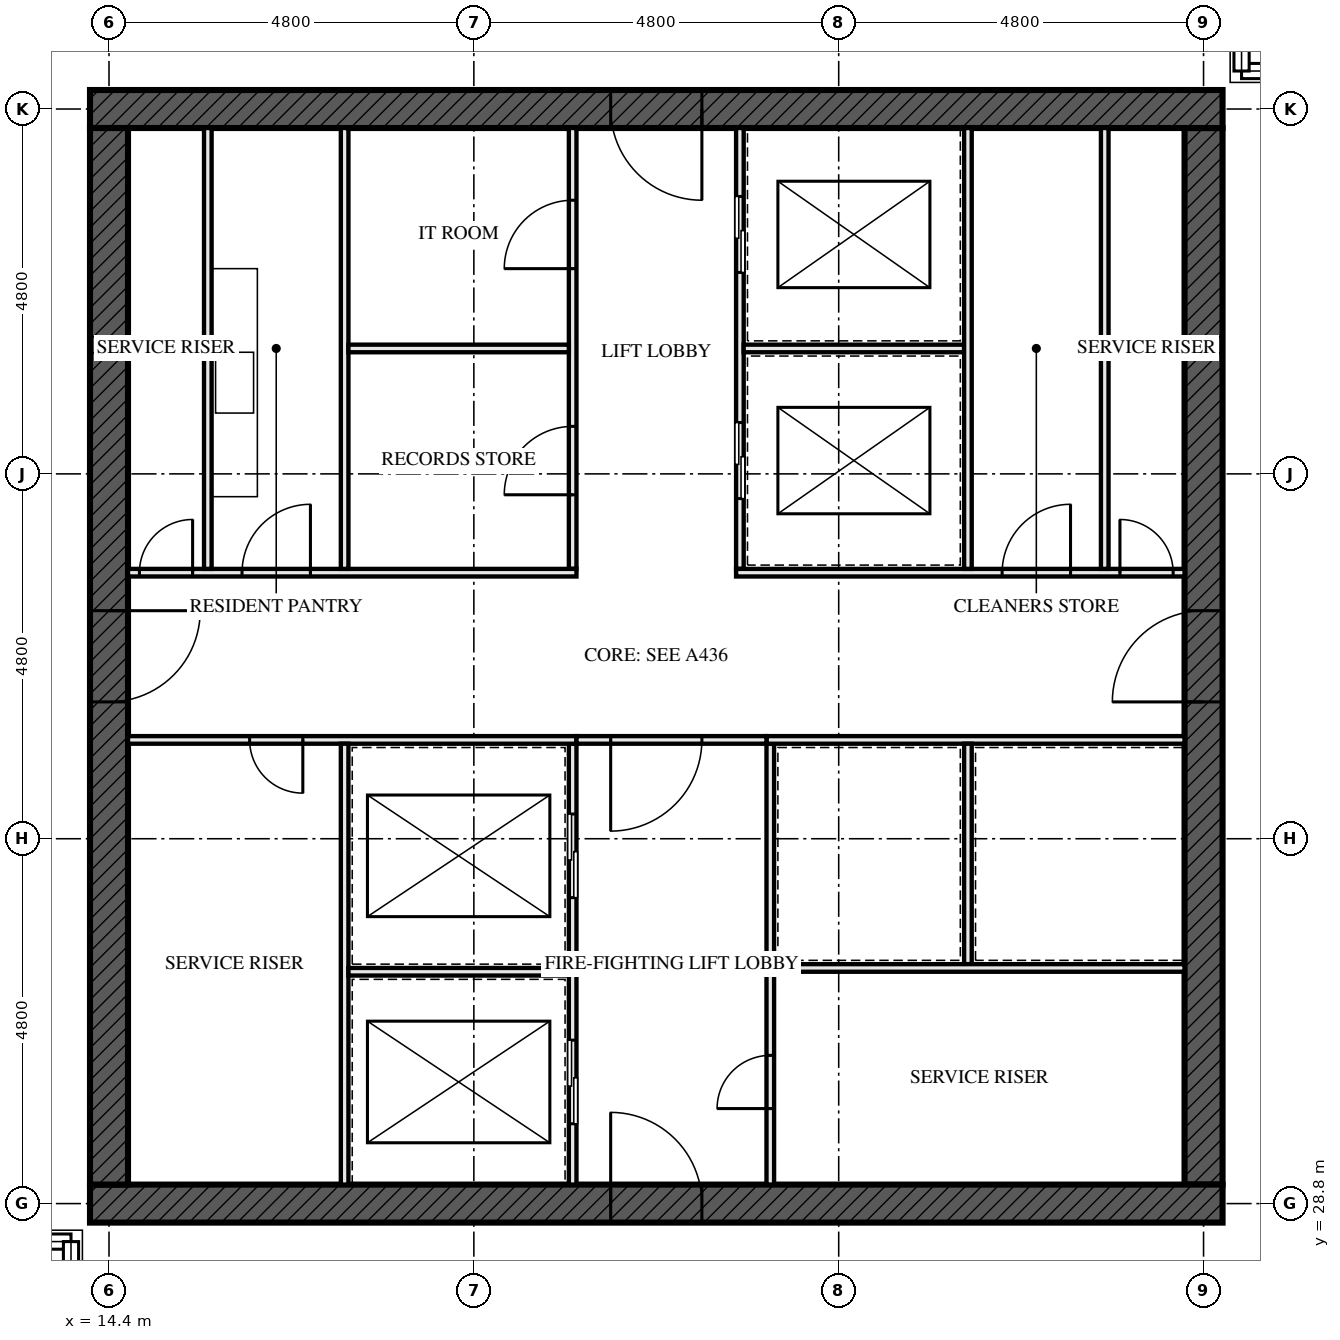
"""IFC4 building model, lengths in metres.
Left out: names, types, materials, properties, quantities, classifications, styles, units other than length and angle.
Written with IfcOpenShell. Run it as: python <this file> out.ifc"""

import sys

from ifc_helpers import new_model, si_unit, direction, frame, frame_2d, origin, place, context, subcontext, project, spatial, rectangle, extrude, element, fill, save


model = new_model("IFC4")
c1 = context("Model", 3, precision=1e-05, world=origin(), true_north=direction((0.0, 1.0)))
c2 = subcontext(c1, "Body", "Model", "MODEL_VIEW")
j1 = project(units=[si_unit("LENGTHUNIT", "METRE"), si_unit("PLANEANGLEUNIT", "RADIAN")], contexts=[c1])
p1 = place(None, origin())
s1 = spatial("IfcSite", under=j1, at=p1, CompositionType="ELEMENT")
p2 = place(p1, origin())
s2 = spatial("IfcBuilding", under=s1, at=p2, CompositionType="ELEMENT")
p3 = place(p2, frame((0.0, 0.0, 136.5)))
s3 = spatial("IfcBuildingStorey", under=s2, at=p3, CompositionType="ELEMENT", Elevation=136.5)
p4 = place(p3, frame((14.15, 28.8, -0.25), z_axis=(0.0, 0.0, 1.0), x_axis=(1.0, 0.0, 0.0)))
e1 = element("IfcWall", 1, at=p4, inside=s3, PredefinedType="SHEAR", context=c2, shape_type="SweptSolid", body=[
    extrude(rectangle(XDim=14.9, YDim=0.5, at=frame_2d((7.45, 0.0))), origin(), (0.0, 0.0, 1.0), 4.58),
])
p5 = place(p4, frame((6.85, 0.0, 0.25)))
e2 = element("IfcOpeningElement", 2, at=p5, cuts=e1, PredefinedType="OPENING", context=c2, shape_type="SweptSolid", body=[
    extrude(rectangle(XDim=1.2, YDim=2.1, at=frame_2d((0.6, 1.05))), frame((0.0, 0.26, 0.0), z_axis=(0.0, -1.0, 0.0), x_axis=(1.0, 0.0, 0.0)), (0.0, 0.0, 1.0), 0.521),
])
p6 = place(p3, frame((29.05, 43.2, -0.25), z_axis=(0.0, 0.0, 1.0), x_axis=(-1.0, 0.0, 0.0)))
e3 = element("IfcWall", 3, at=p6, inside=s3, PredefinedType="SHEAR", context=c2, shape_type="SweptSolid", body=[
    extrude(rectangle(XDim=14.9, YDim=0.5, at=frame_2d((7.45, 0.0))), origin(), (0.0, 0.0, 1.0), 4.58),
])
p7 = place(p6, frame((6.85, 0.0, 0.25)))
e4 = element("IfcOpeningElement", 4, at=p7, cuts=e3, PredefinedType="OPENING", context=c2, shape_type="SweptSolid", body=[
    extrude(rectangle(XDim=1.2, YDim=2.1, at=frame_2d((0.6, 1.05))), frame((0.0, 0.26, 0.0), z_axis=(0.0, -1.0, 0.0), x_axis=(1.0, 0.0, 0.0)), (0.0, 0.0, 1.0), 0.521),
])
p8 = place(p3, frame((14.4, 42.95, -0.25), z_axis=(0.0, 0.0, 1.0), x_axis=(0.0, -1.0, 0.0)))
e5 = element("IfcWall", 5, at=p8, inside=s3, PredefinedType="SHEAR", context=c2, shape_type="SweptSolid", body=[
    extrude(rectangle(XDim=13.9, YDim=0.5, at=frame_2d((6.95, 0.0))), origin(), (0.0, 0.0, 1.0), 4.58),
])
p9 = place(p8, frame((6.35, 0.0, 0.25)))
e6 = element("IfcOpeningElement", 6, at=p9, cuts=e5, PredefinedType="OPENING", context=c2, shape_type="SweptSolid", body=[
    extrude(rectangle(XDim=1.2, YDim=2.1, at=frame_2d((0.6, 1.05))), frame((0.0, 0.26, 0.0), z_axis=(0.0, -1.0, 0.0), x_axis=(1.0, 0.0, 0.0)), (0.0, 0.0, 1.0), 0.521),
])
p10 = place(p3, frame((28.8, 29.05, -0.25), z_axis=(0.0, 0.0, 1.0), x_axis=(0.0, 1.0, 0.0)))
e7 = element("IfcWall", 7, at=p10, inside=s3, PredefinedType="SHEAR", context=c2, shape_type="SweptSolid", body=[
    extrude(rectangle(XDim=13.9, YDim=0.5, at=frame_2d((6.95, 0.0))), origin(), (0.0, 0.0, 1.0), 4.58),
])
p11 = place(p10, frame((6.35, 0.0, 0.25)))
e8 = element("IfcOpeningElement", 8, at=p11, cuts=e7, PredefinedType="OPENING", context=c2, shape_type="SweptSolid", body=[
    extrude(rectangle(XDim=1.2, YDim=2.1, at=frame_2d((0.6, 1.05))), frame((0.0, 0.26, 0.0), z_axis=(0.0, -1.0, 0.0), x_axis=(1.0, 0.0, 0.0)), (0.0, 0.0, 1.0), 0.521),
])
for number, where, z_axis, x_axis in (
    (9, (15.7, 37.15, 0.0), (0.0, 0.0, 1.0), (0.0, 1.0, 0.0)),
    (10, (27.5, 37.15, 0.0), (0.0, 0.0, 1.0), (0.0, 1.0, 0.0)),
):
    element("IfcWall", number, at=place(p3, frame(where, z_axis=z_axis, x_axis=x_axis)), inside=s3, PredefinedType="SOLIDWALL", context=c2, shape_type="SweptSolid", body=[
        extrude(rectangle(XDim=5.8, YDim=0.1, at=frame_2d((2.9, 0.0))), origin(), (0.0, 0.0, 1.0), 4.33),
    ])
p12 = place(p3, frame((20.5, 29.05, 0.0), z_axis=(0.0, 0.0, 1.0), x_axis=(0.0, 1.0, 0.0)))
e11 = element("IfcWall", 11, at=p12, inside=s3, PredefinedType="SOLIDWALL", context=c2, shape_type="SweptSolid", body=[
    extrude(rectangle(XDim=5.8, YDim=0.1, at=frame_2d((2.9, 0.0))), origin(), (0.0, 0.0, 1.0), 4.33),
])
p13 = place(p12, frame((0.8, 0.0, 0.0)))
e12 = element("IfcOpeningElement", 12, at=p13, cuts=e11, PredefinedType="OPENING", context=c2, shape_type="SweptSolid", body=[
    extrude(rectangle(XDim=1.1, YDim=2.3, at=frame_2d((0.55, 1.15))), frame((0.0, 0.061, 0.0), z_axis=(0.0, -1.0, 0.0), x_axis=(1.0, 0.0, 0.0)), (0.0, 0.0, 1.0), 0.121),
])
p14 = place(p12, frame((3.775, 0.0, 0.0)))
e13 = element("IfcOpeningElement", 13, at=p14, cuts=e11, PredefinedType="OPENING", context=c2, shape_type="SweptSolid", body=[
    extrude(rectangle(XDim=1.1, YDim=2.3, at=frame_2d((0.55, 1.15))), frame((0.0, 0.061, 0.0), z_axis=(0.0, -1.0, 0.0), x_axis=(1.0, 0.0, 0.0)), (0.0, 0.0, 1.0), 0.121),
])
p15 = place(p3, frame((20.5, 37.15, 0.0), z_axis=(0.0, 0.0, 1.0), x_axis=(0.0, 1.0, 0.0)))
e14 = element("IfcWall", 14, at=p15, inside=s3, PredefinedType="SOLIDWALL", context=c2, shape_type="SweptSolid", body=[
    extrude(rectangle(XDim=5.8, YDim=0.1, at=frame_2d((2.9, 0.0))), origin(), (0.0, 0.0, 1.0), 4.33),
])
p16 = place(p15, frame((0.975, 0.0, 0.0)))
e15 = element("IfcOpeningElement", 15, at=p16, cuts=e14, PredefinedType="OPENING", context=c2, shape_type="SweptSolid", body=[
    extrude(rectangle(XDim=0.9, YDim=2.1, at=frame_2d((0.45, 1.05))), frame((0.0, 0.061, 0.0), z_axis=(0.0, -1.0, 0.0), x_axis=(1.0, 0.0, 0.0)), (0.0, 0.0, 1.0), 0.121),
])
p17 = place(p15, frame((3.95, 0.0, 0.0)))
e16 = element("IfcOpeningElement", 16, at=p17, cuts=e14, PredefinedType="OPENING", context=c2, shape_type="SweptSolid", body=[
    extrude(rectangle(XDim=0.9, YDim=2.1, at=frame_2d((0.45, 1.05))), frame((0.0, 0.061, 0.0), z_axis=(0.0, -1.0, 0.0), x_axis=(1.0, 0.0, 0.0)), (0.0, 0.0, 1.0), 0.121),
])
p18 = place(p3, frame((22.7, 37.15, 0.0), z_axis=(0.0, 0.0, 1.0), x_axis=(0.0, 1.0, 0.0)))
e17 = element("IfcWall", 17, at=p18, inside=s3, PredefinedType="SOLIDWALL", context=c2, shape_type="SweptSolid", body=[
    extrude(rectangle(XDim=5.8, YDim=0.1, at=frame_2d((2.9, 0.0))), origin(), (0.0, 0.0, 1.0), 4.33),
])
p19 = place(p18, frame((0.925, 0.0, 0.0)))
e18 = element("IfcOpeningElement", 18, at=p19, cuts=e17, PredefinedType="OPENING", context=c2, shape_type="SweptSolid", body=[
    extrude(rectangle(XDim=1.0, YDim=2.1, at=frame_2d((0.5, 1.05))), frame((0.0, 0.061, 0.0), z_axis=(0.0, -1.0, 0.0), x_axis=(1.0, 0.0, 0.0)), (0.0, 0.0, 1.0), 0.121),
])
p20 = place(p18, frame((3.9, 0.0, 0.0)))
e19 = element("IfcOpeningElement", 19, at=p20, cuts=e17, PredefinedType="OPENING", context=c2, shape_type="SweptSolid", body=[
    extrude(rectangle(XDim=1.0, YDim=2.1, at=frame_2d((0.5, 1.05))), frame((0.0, 0.061, 0.0), z_axis=(0.0, -1.0, 0.0), x_axis=(1.0, 0.0, 0.0)), (0.0, 0.0, 1.0), 0.121),
])
p21 = place(p3, frame((23.1, 29.05, 0.0), z_axis=(0.0, 0.0, 1.0), x_axis=(0.0, 1.0, 0.0)))
e20 = element("IfcWall", 20, at=p21, inside=s3, PredefinedType="SOLIDWALL", context=c2, shape_type="SweptSolid", body=[
    extrude(rectangle(XDim=5.8, YDim=0.1, at=frame_2d((2.9, 0.0))), origin(), (0.0, 0.0, 1.0), 4.33),
])
p22 = place(p21, frame((1.0, 0.0, 0.0)))
e21 = element("IfcOpeningElement", 21, at=p22, cuts=e20, PredefinedType="OPENING", context=c2, shape_type="SweptSolid", body=[
    extrude(rectangle(XDim=0.7, YDim=2.1, at=frame_2d((0.35, 1.05))), frame((0.0, 0.061, 0.0), z_axis=(0.0, -1.0, 0.0), x_axis=(1.0, 0.0, 0.0)), (0.0, 0.0, 1.0), 0.121),
])
p23 = place(p3, frame((14.65, 34.9, 0.0), z_axis=(0.0, 0.0, 1.0), x_axis=(1.0, 0.0, 0.0)))
e22 = element("IfcWall", 22, at=p23, inside=s3, PredefinedType="SOLIDWALL", context=c2, shape_type="SweptSolid", body=[
    extrude(rectangle(XDim=5.9, YDim=0.1, at=frame_2d((2.95, 0.0))), origin(), (0.0, 0.0, 1.0), 4.33),
])
p24 = place(p23, frame((1.6, 0.0, 0.0)))
e23 = element("IfcOpeningElement", 23, at=p24, cuts=e22, PredefinedType="OPENING", context=c2, shape_type="SweptSolid", body=[
    extrude(rectangle(XDim=0.7, YDim=2.1, at=frame_2d((0.35, 1.05))), frame((0.0, 0.061, 0.0), z_axis=(0.0, -1.0, 0.0), x_axis=(1.0, 0.0, 0.0)), (0.0, 0.0, 1.0), 0.121),
])
p25 = place(p3, frame((23.05, 34.9, 0.0), z_axis=(0.0, 0.0, 1.0), x_axis=(1.0, 0.0, 0.0)))
e24 = element("IfcWall", 24, at=p25, inside=s3, PredefinedType="SOLIDWALL", context=c2, shape_type="SweptSolid", body=[
    extrude(rectangle(XDim=5.5, YDim=0.1, at=frame_2d((2.75, 0.0))), origin(), (0.0, 0.0, 1.0), 4.33),
])
p26 = place(p3, frame((14.65, 37.1, 0.0), z_axis=(0.0, 0.0, 1.0), x_axis=(1.0, 0.0, 0.0)))
e25 = element("IfcWall", 25, at=p26, inside=s3, PredefinedType="SOLIDWALL", context=c2, shape_type="SweptSolid", body=[
    extrude(rectangle(XDim=5.9, YDim=0.1, at=frame_2d((2.95, 0.0))), origin(), (0.0, 0.0, 1.0), 4.33),
])
p27 = place(p26, frame((0.15, 0.0, 0.0)))
e26 = element("IfcOpeningElement", 26, at=p27, cuts=e25, PredefinedType="OPENING", context=c2, shape_type="SweptSolid", body=[
    extrude(rectangle(XDim=0.7, YDim=2.1, at=frame_2d((0.35, 1.05))), frame((0.0, 0.061, 0.0), z_axis=(0.0, -1.0, 0.0), x_axis=(1.0, 0.0, 0.0)), (0.0, 0.0, 1.0), 0.121),
])
p28 = place(p26, frame((1.5, 0.0, 0.0)))
e27 = element("IfcOpeningElement", 27, at=p28, cuts=e25, PredefinedType="OPENING", context=c2, shape_type="SweptSolid", body=[
    extrude(rectangle(XDim=0.9, YDim=2.1, at=frame_2d((0.45, 1.05))), frame((0.0, 0.061, 0.0), z_axis=(0.0, -1.0, 0.0), x_axis=(1.0, 0.0, 0.0)), (0.0, 0.0, 1.0), 0.121),
])
p29 = place(p3, frame((22.65, 37.1, 0.0), z_axis=(0.0, 0.0, 1.0), x_axis=(1.0, 0.0, 0.0)))
e28 = element("IfcWall", 28, at=p29, inside=s3, PredefinedType="SOLIDWALL", context=c2, shape_type="SweptSolid", body=[
    extrude(rectangle(XDim=5.9, YDim=0.1, at=frame_2d((2.95, 0.0))), origin(), (0.0, 0.0, 1.0), 4.33),
])
p30 = place(p29, frame((3.5, 0.0, 0.0)))
e29 = element("IfcOpeningElement", 29, at=p30, cuts=e28, PredefinedType="OPENING", context=c2, shape_type="SweptSolid", body=[
    extrude(rectangle(XDim=0.9, YDim=2.1, at=frame_2d((0.45, 1.05))), frame((0.0, 0.061, 0.0), z_axis=(0.0, -1.0, 0.0), x_axis=(1.0, 0.0, 0.0)), (0.0, 0.0, 1.0), 0.121),
])
p31 = place(p29, frame((5.05, 0.0, 0.0)))
e30 = element("IfcOpeningElement", 30, at=p31, cuts=e28, PredefinedType="OPENING", context=c2, shape_type="SweptSolid", body=[
    extrude(rectangle(XDim=0.7, YDim=2.1, at=frame_2d((0.35, 1.05))), frame((0.0, 0.061, 0.0), z_axis=(0.0, -1.0, 0.0), x_axis=(1.0, 0.0, 0.0)), (0.0, 0.0, 1.0), 0.121),
])
p32 = place(p3, frame((20.55, 34.9, 0.0), z_axis=(0.0, 0.0, 1.0), x_axis=(1.0, 0.0, 0.0)))
e31 = element("IfcWall", 31, at=p32, inside=s3, PredefinedType="SOLIDWALL", context=c2, shape_type="SweptSolid", body=[
    extrude(rectangle(XDim=2.5, YDim=0.1, at=frame_2d((1.25, 0.0))), origin(), (0.0, 0.0, 1.0), 4.33),
])
p33 = place(p32, frame((0.45, 0.0, 0.0)))
e32 = element("IfcOpeningElement", 32, at=p33, cuts=e31, PredefinedType="OPENING", context=c2, shape_type="SweptSolid", body=[
    extrude(rectangle(XDim=1.2, YDim=2.1, at=frame_2d((0.6, 1.05))), frame((0.0, 0.061, 0.0), z_axis=(0.0, -1.0, 0.0), x_axis=(1.0, 0.0, 0.0)), (0.0, 0.0, 1.0), 0.121),
])
p34 = place(p3, frame((17.5, 29.05, 0.0), z_axis=(0.0, 0.0, 1.0), x_axis=(0.0, 1.0, 0.0)))
e33 = element("IfcWall", 33, at=p34, inside=s3, PredefinedType="SOLIDWALL", context=c2, shape_type="SweptSolid", body=[
    extrude(rectangle(XDim=5.8, YDim=0.1, at=frame_2d((2.9, 0.0))), origin(), (0.0, 0.0, 1.0), 4.33),
])
p35 = place(p3, frame((17.55, 31.85, 0.0), z_axis=(0.0, 0.0, 1.0), x_axis=(1.0, 0.0, 0.0)))
e34 = element("IfcWall", 34, at=p35, inside=s3, PredefinedType="SOLIDWALL", context=c2, shape_type="SweptSolid", body=[
    extrude(rectangle(XDim=2.9, YDim=0.1, at=frame_2d((1.45, 0.0))), origin(), (0.0, 0.0, 1.0), 4.33),
])
p36 = place(p3, frame((17.5, 37.15, 0.0), z_axis=(0.0, 0.0, 1.0), x_axis=(0.0, 1.0, 0.0)))
e35 = element("IfcWall", 35, at=p36, inside=s3, PredefinedType="SOLIDWALL", context=c2, shape_type="SweptSolid", body=[
    extrude(rectangle(XDim=5.8, YDim=0.1, at=frame_2d((2.9, 0.0))), origin(), (0.0, 0.0, 1.0), 4.33),
])
for number, where, z_axis, x_axis in (
    (36, (17.55, 40.05, 0.0), (0.0, 0.0, 1.0), (1.0, 0.0, 0.0)),
    (37, (22.75, 40.05, 0.0), (0.0, 0.0, 1.0), (1.0, 0.0, 0.0)),
):
    element("IfcWall", number, at=place(p3, frame(where, z_axis=z_axis, x_axis=x_axis)), inside=s3, PredefinedType="SOLIDWALL", context=c2, shape_type="SweptSolid", body=[
        extrude(rectangle(XDim=2.9, YDim=0.1, at=frame_2d((1.45, 0.0))), origin(), (0.0, 0.0, 1.0), 4.33),
    ])
p37 = place(p3, frame((25.7, 37.15, 0.0), z_axis=(0.0, 0.0, 1.0), x_axis=(0.0, 1.0, 0.0)))
e38 = element("IfcWall", 38, at=p37, inside=s3, PredefinedType="SOLIDWALL", context=c2, shape_type="SweptSolid", body=[
    extrude(rectangle(XDim=5.8, YDim=0.1, at=frame_2d((2.9, 0.0))), origin(), (0.0, 0.0, 1.0), 4.33),
])
p38 = place(p3, frame((25.7, 31.95, 0.0), z_axis=(0.0, 0.0, 1.0), x_axis=(0.0, 1.0, 0.0)))
e39 = element("IfcWall", 39, at=p38, inside=s3, PredefinedType="SOLIDWALL", context=c2, shape_type="SweptSolid", body=[
    extrude(rectangle(XDim=2.9, YDim=0.1, at=frame_2d((1.45, 0.0))), origin(), (0.0, 0.0, 1.0), 4.33),
])
p39 = place(p3, frame((23.15, 31.9, 0.0), z_axis=(0.0, 0.0, 1.0), x_axis=(1.0, 0.0, 0.0)))
e40 = element("IfcWall", 40, at=p39, inside=s3, PredefinedType="SOLIDWALL", context=c2, shape_type="SweptSolid", body=[
    extrude(rectangle(XDim=5.4, YDim=0.1, at=frame_2d((2.7, 0.0))), origin(), (0.0, 0.0, 1.0), 4.33),
])
p40 = place(p13, origin())
e41 = element("IfcDoor", 41, at=p40, inside=s3, OperationType="SLIDING_TO_LEFT", PredefinedType="DOOR", context=c2, shape_type="SweptSolid", body=[
    extrude(rectangle(XDim=1.1, YDim=2.3, at=frame_2d((0.55, 1.15))), frame((0.0, 0.05, 0.0), z_axis=(0.0, -1.0, 0.0), x_axis=(1.0, 0.0, 0.0)), (0.0, 0.0, 1.0), 0.1),
])
fill(e12, e41)
p41 = place(p14, origin())
e42 = element("IfcDoor", 42, at=p41, inside=s3, OperationType="SLIDING_TO_LEFT", PredefinedType="DOOR", context=c2, shape_type="SweptSolid", body=[
    extrude(rectangle(XDim=1.1, YDim=2.3, at=frame_2d((0.55, 1.15))), frame((0.0, 0.05, 0.0), z_axis=(0.0, -1.0, 0.0), x_axis=(1.0, 0.0, 0.0)), (0.0, 0.0, 1.0), 0.1),
])
fill(e13, e42)
p42 = place(p16, origin())
e43 = element("IfcDoor", 43, at=p42, inside=s3, OperationType="SINGLE_SWING_RIGHT", PredefinedType="DOOR", context=c2, shape_type="SweptSolid", body=[
    extrude(rectangle(XDim=0.9, YDim=2.1, at=frame_2d((0.45, 1.05))), frame((0.0, 0.027, 0.0), z_axis=(0.0, -1.0, 0.0), x_axis=(1.0, 0.0, 0.0)), (0.0, 0.0, 1.0), 0.054),
])
fill(e15, e43)
p43 = place(p17, origin())
e44 = element("IfcDoor", 44, at=p43, inside=s3, OperationType="SINGLE_SWING_RIGHT", PredefinedType="DOOR", context=c2, shape_type="SweptSolid", body=[
    extrude(rectangle(XDim=0.9, YDim=2.1, at=frame_2d((0.45, 1.05))), frame((0.0, 0.027, 0.0), z_axis=(0.0, -1.0, 0.0), x_axis=(1.0, 0.0, 0.0)), (0.0, 0.0, 1.0), 0.054),
])
fill(e16, e44)
p44 = place(p19, origin())
e45 = element("IfcDoor", 45, at=p44, inside=s3, OperationType="SLIDING_TO_LEFT", PredefinedType="DOOR", context=c2, shape_type="SweptSolid", body=[
    extrude(rectangle(XDim=1.0, YDim=2.1, at=frame_2d((0.5, 1.05))), frame((0.0, 0.05, 0.0), z_axis=(0.0, -1.0, 0.0), x_axis=(1.0, 0.0, 0.0)), (0.0, 0.0, 1.0), 0.1),
])
fill(e18, e45)
p45 = place(p20, origin())
e46 = element("IfcDoor", 46, at=p45, inside=s3, OperationType="SLIDING_TO_LEFT", PredefinedType="DOOR", context=c2, shape_type="SweptSolid", body=[
    extrude(rectangle(XDim=1.0, YDim=2.1, at=frame_2d((0.5, 1.05))), frame((0.0, 0.05, 0.0), z_axis=(0.0, -1.0, 0.0), x_axis=(1.0, 0.0, 0.0)), (0.0, 0.0, 1.0), 0.1),
])
fill(e19, e46)
p46 = place(p22, origin())
e47 = element("IfcDoor", 47, at=p46, inside=s3, OperationType="SINGLE_SWING_RIGHT", PredefinedType="DOOR", context=c2, shape_type="SweptSolid", body=[
    extrude(rectangle(XDim=0.7, YDim=2.1, at=frame_2d((0.35, 1.05))), frame((0.0, 0.027, 0.0), z_axis=(0.0, -1.0, 0.0), x_axis=(1.0, 0.0, 0.0)), (0.0, 0.0, 1.0), 0.054),
])
fill(e21, e47)
p47 = place(p24, frame((0.7, 0.0, 0.0), z_axis=(0.0, 0.0, 1.0), x_axis=(-1.0, 0.0, 0.0)))
e48 = element("IfcDoor", 48, at=p47, inside=s3, OperationType="SINGLE_SWING_RIGHT", PredefinedType="DOOR", context=c2, shape_type="SweptSolid", body=[
    extrude(rectangle(XDim=0.7, YDim=2.1, at=frame_2d((0.35, 1.05))), frame((0.0, 0.027, 0.0), z_axis=(0.0, -1.0, 0.0), x_axis=(1.0, 0.0, 0.0)), (0.0, 0.0, 1.0), 0.054),
])
fill(e23, e48)
p48 = place(p27, origin())
e49 = element("IfcDoor", 49, at=p48, inside=s3, OperationType="SINGLE_SWING_LEFT", PredefinedType="DOOR", context=c2, shape_type="SweptSolid", body=[
    extrude(rectangle(XDim=0.7, YDim=2.1, at=frame_2d((0.35, 1.05))), frame((0.0, 0.027, 0.0), z_axis=(0.0, -1.0, 0.0), x_axis=(1.0, 0.0, 0.0)), (0.0, 0.0, 1.0), 0.054),
])
fill(e26, e49)
p49 = place(p28, origin())
e50 = element("IfcDoor", 50, at=p49, inside=s3, OperationType="SINGLE_SWING_LEFT", PredefinedType="DOOR", context=c2, shape_type="SweptSolid", body=[
    extrude(rectangle(XDim=0.9, YDim=2.1, at=frame_2d((0.45, 1.05))), frame((0.0, 0.027, 0.0), z_axis=(0.0, -1.0, 0.0), x_axis=(1.0, 0.0, 0.0)), (0.0, 0.0, 1.0), 0.054),
])
fill(e27, e50)
p50 = place(p30, origin())
e51 = element("IfcDoor", 51, at=p50, inside=s3, OperationType="SINGLE_SWING_LEFT", PredefinedType="DOOR", context=c2, shape_type="SweptSolid", body=[
    extrude(rectangle(XDim=0.9, YDim=2.1, at=frame_2d((0.45, 1.05))), frame((0.0, 0.027, 0.0), z_axis=(0.0, -1.0, 0.0), x_axis=(1.0, 0.0, 0.0)), (0.0, 0.0, 1.0), 0.054),
])
fill(e29, e51)
p51 = place(p31, origin())
e52 = element("IfcDoor", 52, at=p51, inside=s3, OperationType="SINGLE_SWING_RIGHT", PredefinedType="DOOR", context=c2, shape_type="SweptSolid", body=[
    extrude(rectangle(XDim=0.7, YDim=2.1, at=frame_2d((0.35, 1.05))), frame((0.0, 0.027, 0.0), z_axis=(0.0, -1.0, 0.0), x_axis=(1.0, 0.0, 0.0)), (0.0, 0.0, 1.0), 0.054),
])
fill(e30, e52)
p52 = place(p33, frame((1.2, 0.0, 0.0), z_axis=(0.0, 0.0, 1.0), x_axis=(-1.0, 0.0, 0.0)))
e53 = element("IfcDoor", 53, at=p52, inside=s3, OperationType="SINGLE_SWING_LEFT", PredefinedType="DOOR", context=c2, shape_type="SweptSolid", body=[
    extrude(rectangle(XDim=1.2, YDim=2.1, at=frame_2d((0.6, 1.05))), frame((0.0, 0.027, 0.0), z_axis=(0.0, -1.0, 0.0), x_axis=(1.0, 0.0, 0.0)), (0.0, 0.0, 1.0), 0.054),
])
fill(e32, e53)
p53 = place(p5, origin())
e54 = element("IfcDoor", 54, at=p53, inside=s3, OperationType="SINGLE_SWING_LEFT", PredefinedType="DOOR", context=c2, shape_type="SweptSolid", body=[
    extrude(rectangle(XDim=1.2, YDim=2.1, at=frame_2d((0.6, 1.05))), frame((0.0, 0.027, 0.0), z_axis=(0.0, -1.0, 0.0), x_axis=(1.0, 0.0, 0.0)), (0.0, 0.0, 1.0), 0.054),
])
fill(e2, e54)
p54 = place(p9, origin())
e55 = element("IfcDoor", 55, at=p54, inside=s3, OperationType="SINGLE_SWING_LEFT", PredefinedType="DOOR", context=c2, shape_type="SweptSolid", body=[
    extrude(rectangle(XDim=1.2, YDim=2.1, at=frame_2d((0.6, 1.05))), frame((0.0, 0.027, 0.0), z_axis=(0.0, -1.0, 0.0), x_axis=(1.0, 0.0, 0.0)), (0.0, 0.0, 1.0), 0.054),
])
fill(e6, e55)
p55 = place(p11, origin())
e56 = element("IfcDoor", 56, at=p55, inside=s3, OperationType="SINGLE_SWING_LEFT", PredefinedType="DOOR", context=c2, shape_type="SweptSolid", body=[
    extrude(rectangle(XDim=1.2, YDim=2.1, at=frame_2d((0.6, 1.05))), frame((0.0, 0.027, 0.0), z_axis=(0.0, -1.0, 0.0), x_axis=(1.0, 0.0, 0.0)), (0.0, 0.0, 1.0), 0.054),
])
fill(e8, e56)
p56 = place(p7, origin())
e57 = element("IfcDoor", 57, at=p56, inside=s3, OperationType="SINGLE_SWING_LEFT", PredefinedType="DOOR", context=c2, shape_type="SweptSolid", body=[
    extrude(rectangle(XDim=1.2, YDim=2.1, at=frame_2d((0.6, 1.05))), frame((0.0, 0.027, 0.0), z_axis=(0.0, -1.0, 0.0), x_axis=(1.0, 0.0, 0.0)), (0.0, 0.0, 1.0), 0.054),
])
fill(e4, e57)
save(model, sys.argv[1])
